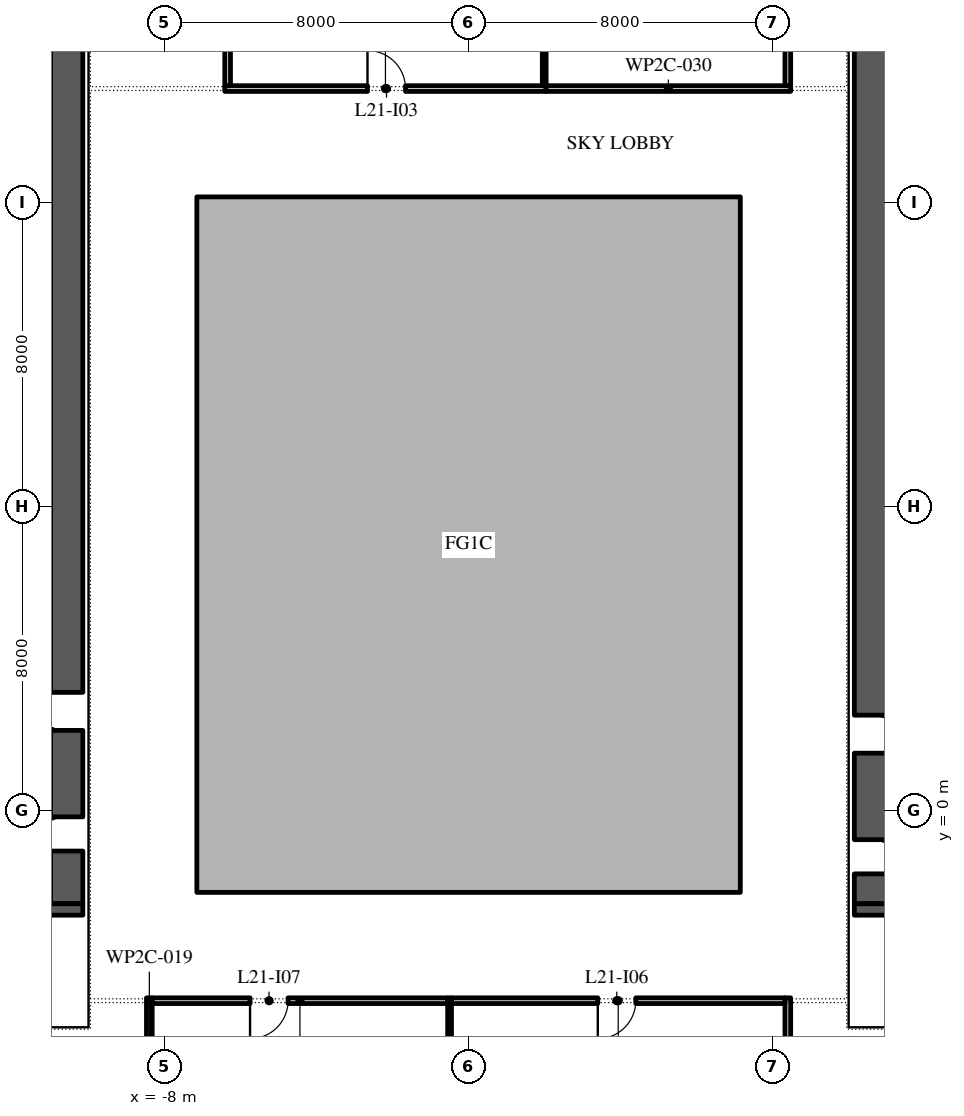
"""IFC4 building model, lengths in metres.
Left out: names, types, materials, properties, quantities, classifications, styles, units other than length and angle.
Written with IfcOpenShell. Run it as: python <this file> out.ifc"""

import sys

from ifc_helpers import new_model, si_unit, direction, frame, frame_2d, origin, place, context, subcontext, project, spatial, polyline, rectangle, outline, extrude, element, fill, save


model = new_model("IFC4")
c1 = context("Model", 3, precision=1e-05, world=origin(), true_north=direction((0.0, 1.0)))
c2 = subcontext(c1, "Body", "Model", "MODEL_VIEW")
j1 = project(units=[si_unit("LENGTHUNIT", "METRE"), si_unit("PLANEANGLEUNIT", "RADIAN")], contexts=[c1])
p1 = place(None, origin())
s1 = spatial("IfcSite", under=j1, at=p1, CompositionType="ELEMENT")
p2 = place(p1, origin())
s2 = spatial("IfcBuilding", under=s1, at=p2, CompositionType="ELEMENT")
p3 = place(p2, frame((0.0, 0.0, 99.6)))
s3 = spatial("IfcBuildingStorey", under=s2, at=p3, CompositionType="ELEMENT", Elevation=99.6)
p4 = place(p3, origin())
e1 = element("IfcWall", 1, at=p4, inside=s3, PredefinedType="STANDARD", context=c2, shape_type="SweptSolid", body=[
    extrude(outline(polyline([(-7.15, -2.15), (7.15, -2.15), (7.15, 16.15), (-7.15, 16.15), (-7.15, -2.15)]), holes=[polyline([(-7.0, -2.0), (-7.0, 16.0), (7.0, 16.0), (7.0, -2.0), (-7.0, -2.0)])]), origin(), (0.0, 0.0, 1.0), 5.8),
])
p5 = place(p3, frame((-10.575, -2.45, 0.0), z_axis=(0.0, 0.0, 1.0), x_axis=(0.0, 1.0, 0.0)))
e2 = element("IfcWall", 2, at=p5, inside=s3, PredefinedType="SHEAR", context=c2, shape_type="SweptSolid", body=[
    extrude(rectangle(XDim=27.9, YDim=0.85, at=frame_2d((13.95, 0.0))), origin(), (0.0, 0.0, 1.0), 5.8),
])
p6 = place(p5, frame((23.65, 0.0, 0.0)))
e3 = element("IfcOpeningElement", 3, at=p6, cuts=e2, PredefinedType="OPENING", context=c2, shape_type="SweptSolid", body=[
    extrude(rectangle(XDim=2.4, YDim=2.1, at=frame_2d((1.2, 1.05))), frame((0.0, 0.435, 0.0), z_axis=(0.0, -1.0, 0.0), x_axis=(1.0, 0.0, 0.0)), (0.0, 0.0, 1.0), 0.87),
])
p7 = place(p5, frame((1.387, 0.0, 0.0)))
e4 = element("IfcOpeningElement", 4, at=p7, cuts=e2, PredefinedType="OPENING", context=c2, shape_type="SweptSolid", body=[
    extrude(rectangle(XDim=0.9, YDim=2.1, at=frame_2d((0.45, 1.05))), frame((0.0, 0.435, 0.0), z_axis=(0.0, -1.0, 0.0), x_axis=(1.0, 0.0, 0.0)), (0.0, 0.0, 1.0), 0.87),
])
p8 = place(p5, frame((4.562, 0.0, 0.0)))
e5 = element("IfcOpeningElement", 5, at=p8, cuts=e2, PredefinedType="OPENING", context=c2, shape_type="SweptSolid", body=[
    extrude(rectangle(XDim=1.0, YDim=2.1, at=frame_2d((0.5, 1.05))), frame((0.0, 0.435, 0.0), z_axis=(0.0, -1.0, 0.0), x_axis=(1.0, 0.0, 0.0)), (0.0, 0.0, 1.0), 0.87),
])
p9 = place(p3, frame((-21.85, -2.6, 0.0), z_axis=(0.0, 0.0, 1.0), x_axis=(1.0, 0.0, 0.0)))
e6 = element("IfcWall", 6, at=p9, inside=s3, PredefinedType="SHEAR", context=c2, shape_type="SweptSolid", body=[
    extrude(rectangle(XDim=11.7, YDim=0.3, at=frame_2d((5.85, 0.0))), origin(), (0.0, 0.0, 1.0), 5.8),
])
p10 = place(p3, frame((10.575, -2.45, 0.0), z_axis=(0.0, 0.0, 1.0), x_axis=(0.0, 1.0, 0.0)))
e7 = element("IfcWall", 7, at=p10, inside=s3, PredefinedType="SHEAR", context=c2, shape_type="SweptSolid", body=[
    extrude(rectangle(XDim=27.9, YDim=0.85, at=frame_2d((13.95, 0.0))), origin(), (0.0, 0.0, 1.0), 5.8),
])
p11 = place(p10, frame((23.65, 0.0, 0.0)))
e8 = element("IfcOpeningElement", 8, at=p11, cuts=e7, PredefinedType="OPENING", context=c2, shape_type="SweptSolid", body=[
    extrude(rectangle(XDim=2.4, YDim=2.1, at=frame_2d((1.2, 1.05))), frame((0.0, 0.435, 0.0), z_axis=(0.0, -1.0, 0.0), x_axis=(1.0, 0.0, 0.0)), (0.0, 0.0, 1.0), 0.87),
])
p12 = place(p10, frame((0.788, 0.0, 0.0)))
e9 = element("IfcOpeningElement", 9, at=p12, cuts=e7, PredefinedType="OPENING", context=c2, shape_type="SweptSolid", body=[
    extrude(rectangle(XDim=0.9, YDim=2.1, at=frame_2d((0.45, 1.05))), frame((0.0, 0.435, 0.0), z_axis=(0.0, -1.0, 0.0), x_axis=(1.0, 0.0, 0.0)), (0.0, 0.0, 1.0), 0.87),
])
p13 = place(p10, frame((3.962, 0.0, 0.0)))
e10 = element("IfcOpeningElement", 10, at=p13, cuts=e7, PredefinedType="OPENING", context=c2, shape_type="SweptSolid", body=[
    extrude(rectangle(XDim=1.0, YDim=2.1, at=frame_2d((0.5, 1.05))), frame((0.0, 0.435, 0.0), z_axis=(0.0, -1.0, 0.0), x_axis=(1.0, 0.0, 0.0)), (0.0, 0.0, 1.0), 0.87),
])
p14 = place(p3, frame((10.15, -2.6, 0.0), z_axis=(0.0, 0.0, 1.0), x_axis=(1.0, 0.0, 0.0)))
e11 = element("IfcWall", 11, at=p14, inside=s3, PredefinedType="SHEAR", context=c2, shape_type="SweptSolid", body=[
    extrude(rectangle(XDim=11.7, YDim=0.3, at=frame_2d((5.85, 0.0))), origin(), (0.0, 0.0, 1.0), 5.8),
])
p15 = place(p3, frame((-8.4, -4.925, 0.0), z_axis=(0.0, 0.0, 1.0), x_axis=(0.0, -1.0, 0.0)))
e12 = element("IfcWall", 12, at=p15, inside=s3, PredefinedType="PARTITIONING", context=c2, shape_type="SweptSolid", body=[
    extrude(rectangle(XDim=2.3, YDim=0.15, at=frame_2d((1.15, 0.0))), origin(), (0.0, 0.0, 1.0), 5.8),
])
p16 = place(p3, frame((-6.415, 19.0, 0.0), z_axis=(0.0, 0.0, 1.0), x_axis=(1.0, 0.0, 0.0)))
e13 = element("IfcWall", 13, at=p16, inside=s3, PredefinedType="PARTITIONING", context=c2, shape_type="SweptSolid", body=[
    extrude(rectangle(XDim=8.455, YDim=0.15, at=frame_2d((4.228, 0.0))), origin(), (0.0, 0.0, 1.0), 5.8),
])
p17 = place(p16, frame((3.755, 0.0, 0.0)))
e14 = element("IfcOpeningElement", 14, at=p17, cuts=e13, PredefinedType="OPENING", context=c2, shape_type="SweptSolid", body=[
    extrude(rectangle(XDim=1.0, YDim=2.1, at=frame_2d((0.5, 1.05))), frame((0.0, 0.085, 0.0), z_axis=(0.0, -1.0, 0.0), x_axis=(1.0, 0.0, 0.0)), (0.0, 0.0, 1.0), 0.17),
])
p18 = place(p3, frame((-6.34, 26.965, 0.0), z_axis=(0.0, 0.0, 1.0), x_axis=(0.0, -1.0, 0.0)))
e15 = element("IfcWall", 15, at=p18, inside=s3, PredefinedType="PARTITIONING", context=c2, shape_type="SweptSolid", body=[
    extrude(rectangle(XDim=7.89, YDim=0.15, at=frame_2d((3.945, 0.0))), origin(), (0.0, 0.0, 1.0), 5.8),
])
p19 = place(p3, frame((-0.5, -15.45, 0.0), z_axis=(0.0, 0.0, 1.0), x_axis=(0.0, 1.0, 0.0)))
e16 = element("IfcWall", 16, at=p19, inside=s3, PredefinedType="PARTITIONING", context=c2, shape_type="SweptSolid", body=[
    extrude(rectangle(XDim=10.525, YDim=0.1, at=frame_2d((5.262, 0.0))), origin(), (0.0, 0.0, 1.0), 5.8),
])
p20 = place(p3, frame((-0.55, -5.0, 0.0), z_axis=(0.0, 0.0, 1.0), x_axis=(-1.0, 0.0, 0.0)))
e17 = element("IfcWall", 17, at=p20, inside=s3, PredefinedType="PARTITIONING", context=c2, shape_type="SweptSolid", body=[
    extrude(rectangle(XDim=7.775, YDim=0.15, at=frame_2d((3.887, 0.0))), origin(), (0.0, 0.0, 1.0), 5.8),
])
p21 = place(p20, frame((4.2, 0.0, 0.0)))
e18 = element("IfcOpeningElement", 18, at=p21, cuts=e17, PredefinedType="OPENING", context=c2, shape_type="SweptSolid", body=[
    extrude(rectangle(XDim=1.0, YDim=2.1, at=frame_2d((0.5, 1.05))), frame((0.0, 0.085, 0.0), z_axis=(0.0, -1.0, 0.0), x_axis=(1.0, 0.0, 0.0)), (0.0, 0.0, 1.0), 0.17),
])
p22 = place(p3, frame((2.04, 19.0, 0.0), z_axis=(0.0, 0.0, 1.0), x_axis=(1.0, 0.0, 0.0)))
e19 = element("IfcWall", 19, at=p22, inside=s3, PredefinedType="PARTITIONING", context=c2, shape_type="SweptSolid", body=[
    extrude(rectangle(XDim=6.435, YDim=0.15, at=frame_2d((3.218, 0.0))), origin(), (0.0, 0.0, 1.0), 5.8),
])
p23 = place(p3, frame((1.99, 27.55, 0.0), z_axis=(0.0, 0.0, 1.0), x_axis=(0.0, -1.0, 0.0)))
e20 = element("IfcWall", 20, at=p23, inside=s3, PredefinedType="PARTITIONING", context=c2, shape_type="SweptSolid", body=[
    extrude(rectangle(XDim=8.475, YDim=0.1, at=frame_2d((4.238, 0.0))), origin(), (0.0, 0.0, 1.0), 5.8),
])
p24 = place(p3, frame((8.4, -7.375, 0.0), z_axis=(0.0, 0.0, 1.0), x_axis=(0.0, 1.0, 0.0)))
e21 = element("IfcWall", 21, at=p24, inside=s3, PredefinedType="PARTITIONING", context=c2, shape_type="SweptSolid", body=[
    extrude(rectangle(XDim=2.45, YDim=0.15, at=frame_2d((1.225, 0.0))), origin(), (0.0, 0.0, 1.0), 5.8),
])
p25 = place(p3, frame((8.325, -5.0, 0.0), z_axis=(0.0, 0.0, 1.0), x_axis=(-1.0, 0.0, 0.0)))
e22 = element("IfcWall", 22, at=p25, inside=s3, PredefinedType="PARTITIONING", context=c2, shape_type="SweptSolid", body=[
    extrude(rectangle(XDim=8.775, YDim=0.15, at=frame_2d((4.387, 0.0))), origin(), (0.0, 0.0, 1.0), 5.8),
])
p26 = place(p25, frame((3.925, 0.0, 0.0)))
e23 = element("IfcOpeningElement", 23, at=p26, cuts=e22, PredefinedType="OPENING", context=c2, shape_type="SweptSolid", body=[
    extrude(rectangle(XDim=1.0, YDim=2.1, at=frame_2d((0.5, 1.05))), frame((0.0, 0.085, 0.0), z_axis=(0.0, -1.0, 0.0), x_axis=(1.0, 0.0, 0.0)), (0.0, 0.0, 1.0), 0.17),
])
p27 = place(p3, frame((8.4, 19.075, 0.0), z_axis=(0.0, 0.0, 1.0), x_axis=(0.0, 1.0, 0.0)))
e24 = element("IfcWall", 24, at=p27, inside=s3, PredefinedType="PARTITIONING", context=c2, shape_type="SweptSolid", body=[
    extrude(rectangle(XDim=8.05, YDim=0.15, at=frame_2d((4.025, 0.0))), origin(), (0.0, 0.0, 1.0), 5.8),
])
p28 = place(p27, frame((4.325, 0.0, 0.0)))
e25 = element("IfcOpeningElement", 25, at=p28, cuts=e24, PredefinedType="OPENING", context=c2, shape_type="SweptSolid", body=[
    extrude(rectangle(XDim=1.0, YDim=2.1, at=frame_2d((0.5, 1.05))), frame((0.0, 0.085, 0.0), z_axis=(0.0, -1.0, 0.0), x_axis=(1.0, 0.0, 0.0)), (0.0, 0.0, 1.0), 0.17),
])
p29 = place(p7, origin())
e26 = element("IfcDoor", 26, at=p29, inside=s3, OperationType="SINGLE_SWING_RIGHT", PredefinedType="DOOR", context=c2, shape_type="SweptSolid", body=[
    extrude(rectangle(XDim=0.9, YDim=2.1, at=frame_2d((0.45, 1.05))), frame((0.0, 0.425, 0.0), z_axis=(0.0, -1.0, 0.0), x_axis=(1.0, 0.0, 0.0)), (0.0, 0.0, 1.0), 0.05),
])
fill(e4, e26)
p30 = place(p8, origin())
e27 = element("IfcDoor", 27, at=p30, inside=s3, OperationType="SINGLE_SWING_LEFT", PredefinedType="DOOR", context=c2, shape_type="SweptSolid", body=[
    extrude(rectangle(XDim=1.0, YDim=2.1, at=frame_2d((0.5, 1.05))), frame((0.0, 0.425, 0.0), z_axis=(0.0, -1.0, 0.0), x_axis=(1.0, 0.0, 0.0)), (0.0, 0.0, 1.0), 0.05),
])
fill(e5, e27)
p31 = place(p12, frame((0.9, -0.8, 0.0), z_axis=(0.0, 0.0, 1.0), x_axis=(-1.0, 0.0, 0.0)))
e28 = element("IfcDoor", 28, at=p31, inside=s3, OperationType="SINGLE_SWING_LEFT", PredefinedType="DOOR", context=c2, shape_type="SweptSolid", body=[
    extrude(rectangle(XDim=0.9, YDim=2.1, at=frame_2d((0.45, 1.05))), frame((0.0, -0.375, 0.0), z_axis=(0.0, -1.0, 0.0), x_axis=(1.0, 0.0, 0.0)), (0.0, 0.0, 1.0), 0.05),
])
fill(e9, e28)
p32 = place(p13, frame((1.0, -0.8, 0.0), z_axis=(0.0, 0.0, 1.0), x_axis=(-1.0, 0.0, 0.0)))
e29 = element("IfcDoor", 29, at=p32, inside=s3, OperationType="SINGLE_SWING_LEFT", PredefinedType="DOOR", context=c2, shape_type="SweptSolid", body=[
    extrude(rectangle(XDim=1.0, YDim=2.1, at=frame_2d((0.5, 1.05))), frame((0.0, -0.375, 0.0), z_axis=(0.0, -1.0, 0.0), x_axis=(1.0, 0.0, 0.0)), (0.0, 0.0, 1.0), 0.05),
])
fill(e10, e29)
p33 = place(p17, origin())
e30 = element("IfcDoor", 30, at=p33, inside=s3, OperationType="SINGLE_SWING_RIGHT", PredefinedType="DOOR", context=c2, shape_type="SweptSolid", body=[
    extrude(rectangle(XDim=1.0, YDim=2.1, at=frame_2d((0.5, 1.05))), frame((0.0, 0.025, 0.0), z_axis=(0.0, -1.0, 0.0), x_axis=(1.0, 0.0, 0.0)), (0.0, 0.0, 1.0), 0.05),
])
fill(e14, e30)
p34 = place(p26, origin())
e31 = element("IfcDoor", 31, at=p34, inside=s3, OperationType="SINGLE_SWING_LEFT", PredefinedType="DOOR", context=c2, shape_type="SweptSolid", body=[
    extrude(rectangle(XDim=1.0, YDim=2.1, at=frame_2d((0.5, 1.05))), frame((0.0, 0.025, 0.0), z_axis=(0.0, -1.0, 0.0), x_axis=(1.0, 0.0, 0.0)), (0.0, 0.0, 1.0), 0.05),
])
fill(e23, e31)
p35 = place(p21, origin())
e32 = element("IfcDoor", 32, at=p35, inside=s3, OperationType="SINGLE_SWING_LEFT", PredefinedType="DOOR", context=c2, shape_type="SweptSolid", body=[
    extrude(rectangle(XDim=1.0, YDim=2.1, at=frame_2d((0.5, 1.05))), frame((0.0, 0.025, 0.0), z_axis=(0.0, -1.0, 0.0), x_axis=(1.0, 0.0, 0.0)), (0.0, 0.0, 1.0), 0.05),
])
fill(e18, e32)
save(model, sys.argv[1])
